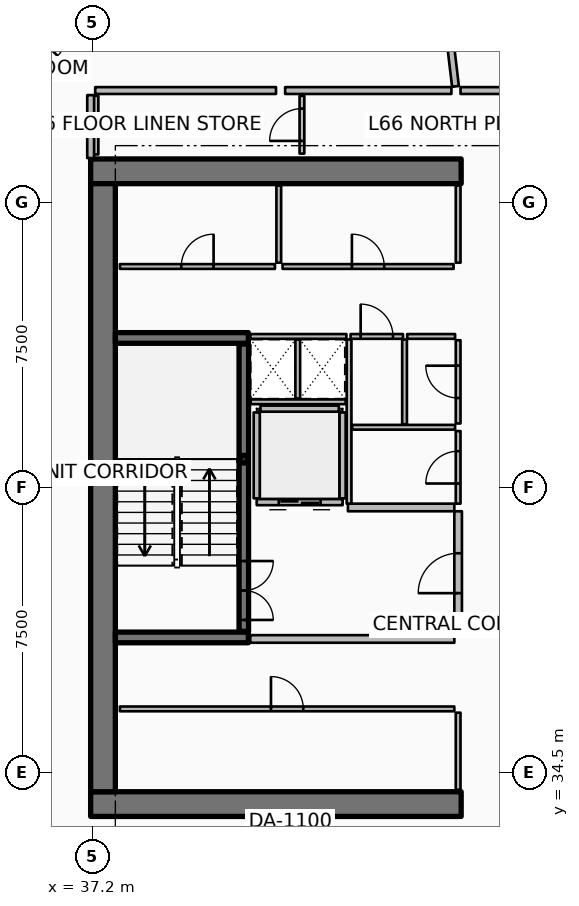
"""IFC4 building model, lengths in metres.
Left out: names, types, materials, properties, quantities, classifications, styles, units other than length and angle.
Written with IfcOpenShell. Run it as: python <this file> out.ifc"""

import sys

from ifc_helpers import new_model, si_unit, direction, frame, frame_2d, origin, origin_2d, place, context, subcontext, project, spatial, rectangle, hollow_rectangle, extrude, element, fill, save


model = new_model("IFC4")
c1 = context("Model", 3, precision=1e-05, world=origin(), true_north=direction((0.0, 1.0)))
c2 = subcontext(c1, "Body", "Model", "MODEL_VIEW")
j1 = project(units=[si_unit("LENGTHUNIT", "METRE"), si_unit("PLANEANGLEUNIT", "RADIAN")], contexts=[c1])
p1 = place(None, origin())
s1 = spatial("IfcSite", under=j1, at=p1, CompositionType="ELEMENT")
p2 = place(p1, origin())
s2 = spatial("IfcBuilding", under=s1, at=p2, CompositionType="ELEMENT")
p3 = place(p2, frame((0.0, 0.0, 263.65)))
s3 = spatial("IfcBuildingStorey", under=s2, at=p3, CompositionType="ELEMENT", Elevation=263.65)
for number, where, z_axis, x_axis in (
    (1, (37.15, 33.675, 0.0), (0.0, 0.0, 1.0), (1.0, 0.0, 0.0)),
    (2, (37.15, 50.325, 0.0), (0.0, 0.0, 1.0), (1.0, 0.0, 0.0)),
):
    element("IfcWall", number, at=place(p3, frame(where, z_axis=z_axis, x_axis=x_axis)), inside=s3, PredefinedType="SHEAR", context=c2, shape_type="SweptSolid", body=[
        extrude(rectangle(XDim=9.75, YDim=0.65, at=frame_2d((4.875, 0.0))), origin(), (0.0, 0.0, 1.0), 3.85),
    ])
p4 = place(p3, frame((37.475, 34.0, 0.0), z_axis=(0.0, 0.0, 1.0), x_axis=(0.0, 1.0, 0.0)))
e3 = element("IfcWall", 3, at=p4, inside=s3, PredefinedType="SHEAR", context=c2, shape_type="SweptSolid", body=[
    extrude(rectangle(XDim=16.0, YDim=0.65, at=frame_2d((8.0, 0.0))), origin(), (0.0, 0.0, 1.0), 3.85),
])
for number, where, z_axis, x_axis in (
    (4, (37.8, 38.06, 0.0), (0.0, 0.0, 1.0), (1.0, 0.0, 0.0)),
    (5, (37.8, 45.94, 0.0), (0.0, 0.0, 1.0), (1.0, 0.0, 0.0)),
):
    element("IfcWall", number, at=place(p3, frame(where, z_axis=z_axis, x_axis=x_axis)), inside=s3, PredefinedType="SHEAR", context=c2, shape_type="SweptSolid", body=[
        extrude(rectangle(XDim=3.5, YDim=0.28, at=frame_2d((1.75, 0.0))), origin(), (0.0, 0.0, 1.0), 3.85),
    ])
p5 = place(p3, frame((41.18, 42.75, 0.0), z_axis=(0.0, 0.0, 1.0), x_axis=(1.0, 0.0, 0.0)))
e6 = element("IfcColumn", 6, at=p5, inside=s3, PredefinedType="COLUMN", context=c2, shape_type="SweptSolid", body=[
    extrude(hollow_rectangle(XDim=0.2, YDim=0.2, WallThickness=0.01, InnerFilletRadius=0.01, OuterFilletRadius=0.02, at=origin_2d()), origin(), (0.0, 0.0, 1.0), 1.72),
])
p6 = place(p3, frame((41.18, 38.22, 0.0), z_axis=(0.0, 0.0, 1.0), x_axis=(0.0, 1.0, 0.0)))
e7 = element("IfcWall", 7, at=p6, inside=s3, PredefinedType="SOLIDWALL", context=c2, shape_type="SweptSolid", body=[
    extrude(rectangle(XDim=7.56, YDim=0.25, at=frame_2d((3.78, 0.0))), origin(), (0.0, 0.0, 1.0), 3.59),
])
p7 = place(p6, frame((0.3, 0.0, 0.0)))
e8 = element("IfcOpeningElement", 8, at=p7, cuts=e7, PredefinedType="OPENING", context=c2, shape_type="SweptSolid", body=[
    extrude(rectangle(XDim=1.55, YDim=2.15, at=frame_2d((0.775, 1.075))), frame((0.0, 0.135, 0.0), z_axis=(0.0, -1.0, 0.0), x_axis=(1.0, 0.0, 0.0)), (0.0, 0.0, 1.0), 0.27),
])
p8 = place(p3, frame((43.78, 41.62, 0.0), z_axis=(0.0, 0.0, 1.0), x_axis=(-1.0, 0.0, 0.0)))
e9 = element("IfcWall", 9, at=p8, inside=s3, PredefinedType="PARTITIONING", context=c2, shape_type="SweptSolid", body=[
    extrude(rectangle(XDim=2.26, YDim=0.16, at=frame_2d((1.13, 0.0))), origin(), (0.0, 0.0, 1.0), 3.59),
])
p9 = place(p8, frame((0.58, 0.0, 0.0)))
e10 = element("IfcOpeningElement", 10, at=p9, cuts=e9, PredefinedType="OPENING", context=c2, shape_type="SweptSolid", body=[
    extrude(rectangle(XDim=1.1, YDim=2.1, at=frame_2d((0.55, 1.05))), frame((0.0, 0.09, 0.0), z_axis=(0.0, -1.0, 0.0), x_axis=(1.0, 0.0, 0.0)), (0.0, 0.0, 1.0), 0.18),
])
for number, where, z_axis, x_axis in (
    (11, (43.78, 41.72, 0.0), (0.0, 0.0, 1.0), (0.0, 1.0, 0.0)),
    (12, (41.52, 41.72, 0.0), (0.0, 0.0, 1.0), (0.0, 1.0, 0.0)),
):
    element("IfcWall", number, at=place(p3, frame(where, z_axis=z_axis, x_axis=x_axis)), inside=s3, PredefinedType="PARTITIONING", context=c2, shape_type="SweptSolid", body=[
        extrude(rectangle(XDim=2.26, YDim=0.16, at=frame_2d((1.13, 0.0))), origin(), (0.0, 0.0, 1.0), 3.59),
    ])
p10 = place(p3, frame((41.62, 44.08, 0.0), z_axis=(0.0, 0.0, 1.0), x_axis=(1.0, 0.0, 0.0)))
e13 = element("IfcWall", 13, at=p10, inside=s3, PredefinedType="PARTITIONING", context=c2, shape_type="SweptSolid", body=[
    extrude(rectangle(XDim=2.06, YDim=0.16, at=frame_2d((1.03, 0.0))), origin(), (0.0, 0.0, 1.0), 3.59),
])
p11 = place(p3, frame((46.82, 34.05, 0.0), z_axis=(0.0, 0.0, 1.0), x_axis=(0.0, 1.0, 0.0)))
e14 = element("IfcWall", 14, at=p11, inside=s3, PredefinedType="PARTITIONING", context=c2, shape_type="SweptSolid", body=[
    extrude(rectangle(XDim=2.03, YDim=0.125, at=frame_2d((1.015, 0.0))), origin(), (0.0, 0.0, 1.0), 3.03),
])
p12 = place(p3, frame((37.92, 36.18, 0.0), z_axis=(0.0, 0.0, 1.0), x_axis=(1.0, 0.0, 0.0)))
e15 = element("IfcWall", 15, at=p12, inside=s3, PredefinedType="PARTITIONING", context=c2, shape_type="SweptSolid", body=[
    extrude(rectangle(XDim=8.8, YDim=0.125, at=frame_2d((4.4, 0.0))), origin(), (0.0, 0.0, 1.0), 3.03),
])
p13 = place(p12, frame((3.975, 0.0, 0.0)))
e16 = element("IfcOpeningElement", 16, at=p13, cuts=e15, PredefinedType="OPENING", context=c2, shape_type="SweptSolid", body=[
    extrude(rectangle(XDim=0.85, YDim=2.06, at=frame_2d((0.425, 1.03))), frame((0.0, 0.073, 0.0), z_axis=(0.0, -1.0, 0.0), x_axis=(1.0, 0.0, 0.0)), (0.0, 0.0, 1.0), 0.145),
])
for number, where, z_axis, x_axis in (
    (17, (46.82, 47.92, 0.0), (0.0, 0.0, 1.0), (0.0, 1.0, 0.0)),
    (18, (42.1, 47.92, 0.0), (0.0, 0.0, 1.0), (0.0, 1.0, 0.0)),
):
    element("IfcWall", number, at=place(p3, frame(where, z_axis=z_axis, x_axis=x_axis)), inside=s3, PredefinedType="PARTITIONING", context=c2, shape_type="SweptSolid", body=[
        extrude(rectangle(XDim=2.03, YDim=0.125, at=frame_2d((1.015, 0.0))), origin(), (0.0, 0.0, 1.0), 3.03),
    ])
p14 = place(p3, frame((37.92, 47.82, 0.0), z_axis=(0.0, 0.0, 1.0), x_axis=(1.0, 0.0, 0.0)))
e19 = element("IfcWall", 19, at=p14, inside=s3, PredefinedType="PARTITIONING", context=c2, shape_type="SweptSolid", body=[
    extrude(rectangle(XDim=4.08, YDim=0.125, at=frame_2d((2.04, 0.0))), origin(), (0.0, 0.0, 1.0), 3.03),
])
p15 = place(p14, frame((1.615, 0.0, 0.0)))
e20 = element("IfcOpeningElement", 20, at=p15, cuts=e19, PredefinedType="OPENING", context=c2, shape_type="SweptSolid", body=[
    extrude(rectangle(XDim=0.85, YDim=2.06, at=frame_2d((0.425, 1.03))), frame((0.0, 0.073, 0.0), z_axis=(0.0, -1.0, 0.0), x_axis=(1.0, 0.0, 0.0)), (0.0, 0.0, 1.0), 0.145),
])
p16 = place(p3, frame((42.2, 47.82, 0.0), z_axis=(0.0, 0.0, 1.0), x_axis=(1.0, 0.0, 0.0)))
e21 = element("IfcWall", 21, at=p16, inside=s3, PredefinedType="PARTITIONING", context=c2, shape_type="SweptSolid", body=[
    extrude(rectangle(XDim=4.5, YDim=0.125, at=frame_2d((2.25, 0.0))), origin(), (0.0, 0.0, 1.0), 3.03),
])
p17 = place(p16, frame((1.825, 0.0, 0.0)))
e22 = element("IfcOpeningElement", 22, at=p17, cuts=e21, PredefinedType="OPENING", context=c2, shape_type="SweptSolid", body=[
    extrude(rectangle(XDim=0.85, YDim=2.06, at=frame_2d((0.425, 1.03))), frame((0.0, 0.073, 0.0), z_axis=(0.0, -1.0, 0.0), x_axis=(1.0, 0.0, 0.0)), (0.0, 0.0, 1.0), 0.145),
])
p18 = place(p3, frame((41.35, 38.02, 0.0), z_axis=(0.0, 0.0, 1.0), x_axis=(1.0, 0.0, 0.0)))
e23 = element("IfcWall", 23, at=p18, inside=s3, PredefinedType="PARTITIONING", context=c2, shape_type="SweptSolid", body=[
    extrude(rectangle(XDim=5.37, YDim=0.2, at=frame_2d((2.685, 0.0))), origin(), (0.0, 0.0, 1.0), 3.59),
])
p19 = place(p3, frame((43.92, 41.48, 0.0), z_axis=(0.0, 0.0, 1.0), x_axis=(1.0, 0.0, 0.0)))
e24 = element("IfcWall", 24, at=p19, inside=s3, PredefinedType="PARTITIONING", context=c2, shape_type="SweptSolid", body=[
    extrude(rectangle(XDim=2.8, YDim=0.2, at=frame_2d((1.4, 0.0))), origin(), (0.0, 0.0, 1.0), 3.59),
])
p20 = place(p3, frame((46.82, 38.12, 0.0), z_axis=(0.0, 0.0, 1.0), x_axis=(0.0, 1.0, 0.0)))
e25 = element("IfcWall", 25, at=p20, inside=s3, PredefinedType="PARTITIONING", context=c2, shape_type="SweptSolid", body=[
    extrude(rectangle(XDim=3.26, YDim=0.2, at=frame_2d((1.63, 0.0))), origin(), (0.0, 0.0, 1.0), 3.59),
])
p21 = place(p20, frame((1.105, 0.0, 0.0)))
e26 = element("IfcOpeningElement", 26, at=p21, cuts=e25, PredefinedType="OPENING", context=c2, shape_type="SweptSolid", body=[
    extrude(rectangle(XDim=1.05, YDim=2.1, at=frame_2d((0.525, 1.05))), frame((0.0, 0.11, 0.0), z_axis=(0.0, -1.0, 0.0), x_axis=(1.0, 0.0, 0.0)), (0.0, 0.0, 1.0), 0.22),
])
p22 = place(p3, frame((41.36, 44.26, 0.0), z_axis=(0.0, 0.0, 1.0), x_axis=(1.0, 0.0, 0.0)))
e27 = element("IfcWall", 27, at=p22, inside=s3, PredefinedType="PARTITIONING", context=c2, shape_type="SweptSolid", body=[
    extrude(rectangle(XDim=2.5, YDim=0.125, at=frame_2d((1.25, 0.0))), origin(), (0.0, 0.0, 1.0), 3.03),
])
p23 = place(p3, frame((42.6, 44.35, 0.0), z_axis=(0.0, 0.0, 1.0), x_axis=(0.0, 1.0, 0.0)))
e28 = element("IfcWall", 28, at=p23, inside=s3, PredefinedType="PARTITIONING", context=c2, shape_type="SweptSolid", body=[
    extrude(rectangle(XDim=1.55, YDim=0.125, at=frame_2d((0.775, 0.0))), origin(), (0.0, 0.0, 1.0), 3.03),
])
p24 = place(p3, frame((43.95, 41.58, 0.0), z_axis=(0.0, 0.0, 1.0), x_axis=(0.0, 1.0, 0.0)))
e29 = element("IfcWall", 29, at=p24, inside=s3, PredefinedType="PARTITIONING", context=c2, shape_type="SweptSolid", body=[
    extrude(rectangle(XDim=4.32, YDim=0.125, at=frame_2d((2.16, 0.0))), origin(), (0.0, 0.0, 1.0), 3.03),
])
p25 = place(p3, frame((44.03, 43.59, 0.0), z_axis=(0.0, 0.0, 1.0), x_axis=(1.0, 0.0, 0.0)))
e30 = element("IfcWall", 30, at=p25, inside=s3, PredefinedType="PARTITIONING", context=c2, shape_type="SweptSolid", body=[
    extrude(rectangle(XDim=2.71, YDim=0.125, at=frame_2d((1.355, 0.0))), origin(), (0.0, 0.0, 1.0), 3.03),
])
p26 = place(p3, frame((45.41, 43.67, 0.0), z_axis=(0.0, 0.0, 1.0), x_axis=(0.0, 1.0, 0.0)))
e31 = element("IfcWall", 31, at=p26, inside=s3, PredefinedType="PARTITIONING", context=c2, shape_type="SweptSolid", body=[
    extrude(rectangle(XDim=2.23, YDim=0.125, at=frame_2d((1.115, 0.0))), origin(), (0.0, 0.0, 1.0), 3.03),
])
p27 = place(p3, frame((46.82, 41.58, 0.0), z_axis=(0.0, 0.0, 1.0), x_axis=(0.0, 1.0, 0.0)))
e32 = element("IfcWall", 32, at=p27, inside=s3, PredefinedType="PARTITIONING", context=c2, shape_type="SweptSolid", body=[
    extrude(rectangle(XDim=1.91, YDim=0.125, at=frame_2d((0.955, 0.0))), origin(), (0.0, 0.0, 1.0), 3.03),
])
p28 = place(p27, frame((0.53, 0.0, 0.0)))
e33 = element("IfcOpeningElement", 33, at=p28, cuts=e32, PredefinedType="OPENING", context=c2, shape_type="SweptSolid", body=[
    extrude(rectangle(XDim=0.85, YDim=2.06, at=frame_2d((0.425, 1.03))), frame((0.0, 0.073, 0.0), z_axis=(0.0, -1.0, 0.0), x_axis=(1.0, 0.0, 0.0)), (0.0, 0.0, 1.0), 0.145),
])
p29 = place(p3, frame((46.82, 43.69, 0.0), z_axis=(0.0, 0.0, 1.0), x_axis=(0.0, 1.0, 0.0)))
e34 = element("IfcWall", 34, at=p29, inside=s3, PredefinedType="PARTITIONING", context=c2, shape_type="SweptSolid", body=[
    extrude(rectangle(XDim=2.19, YDim=0.125, at=frame_2d((1.095, 0.0))), origin(), (0.0, 0.0, 1.0), 3.03),
])
p30 = place(p29, frame((0.67, 0.0, 0.0)))
e35 = element("IfcOpeningElement", 35, at=p30, cuts=e34, PredefinedType="OPENING", context=c2, shape_type="SweptSolid", body=[
    extrude(rectangle(XDim=0.85, YDim=2.06, at=frame_2d((0.425, 1.03))), frame((0.0, 0.073, 0.0), z_axis=(0.0, -1.0, 0.0), x_axis=(1.0, 0.0, 0.0)), (0.0, 0.0, 1.0), 0.145),
])
p31 = place(p3, frame((41.35, 45.98, 0.0), z_axis=(0.0, 0.0, 1.0), x_axis=(1.0, 0.0, 0.0)))
e36 = element("IfcWall", 36, at=p31, inside=s3, PredefinedType="PARTITIONING", context=c2, shape_type="SweptSolid", body=[
    extrude(rectangle(XDim=2.53, YDim=0.125, at=frame_2d((1.265, 0.0))), origin(), (0.0, 0.0, 1.0), 3.03),
])
p32 = place(p3, frame((43.99, 45.98, 0.0), z_axis=(0.0, 0.0, 1.0), x_axis=(1.0, 0.0, 0.0)))
e37 = element("IfcWall", 37, at=p32, inside=s3, PredefinedType="PARTITIONING", context=c2, shape_type="SweptSolid", body=[
    extrude(rectangle(XDim=1.38, YDim=0.125, at=frame_2d((0.69, 0.0))), origin(), (0.0, 0.0, 1.0), 3.03),
])
p33 = place(p32, frame((0.265, 0.0, 0.0)))
e38 = element("IfcOpeningElement", 38, at=p33, cuts=e37, PredefinedType="OPENING", context=c2, shape_type="SweptSolid", body=[
    extrude(rectangle(XDim=0.85, YDim=2.06, at=frame_2d((0.425, 1.03))), frame((0.0, 0.073, 0.0), z_axis=(0.0, -1.0, 0.0), x_axis=(1.0, 0.0, 0.0)), (0.0, 0.0, 1.0), 0.145),
])
p34 = place(p3, frame((45.48, 45.98, 0.0), z_axis=(0.0, 0.0, 1.0), x_axis=(1.0, 0.0, 0.0)))
e39 = element("IfcWall", 39, at=p34, inside=s3, PredefinedType="PARTITIONING", context=c2, shape_type="SweptSolid", body=[
    extrude(rectangle(XDim=1.26, YDim=0.125, at=frame_2d((0.63, 0.0))), origin(), (0.0, 0.0, 1.0), 3.03),
])
p35 = place(p3, frame((37.29, 50.77, 0.0), z_axis=(0.0, 0.0, 1.0), x_axis=(0.0, 1.0, 0.0)))
e40 = element("IfcWall", 40, at=p35, inside=s3, PredefinedType="PARTITIONING", context=c2, shape_type="SweptSolid", body=[
    extrude(rectangle(XDim=1.54, YDim=0.125, at=frame_2d((0.77, 0.0))), origin(), (0.0, 0.0, 1.0), 3.03),
])
p36 = place(p3, frame((42.71, 50.79, 0.0), z_axis=(0.0, 0.0, 1.0), x_axis=(0.0, 1.0, 0.0)))
e41 = element("IfcWall", 41, at=p36, inside=s3, PredefinedType="PARTITIONING", context=c2, shape_type="SweptSolid", body=[
    extrude(rectangle(XDim=1.52, YDim=0.125, at=frame_2d((0.76, 0.0))), origin(), (0.0, 0.0, 1.0), 2.957),
])
p37 = place(p36, frame((0.335, 0.0, 0.0)))
e42 = element("IfcOpeningElement", 42, at=p37, cuts=e41, PredefinedType="OPENING", context=c2, shape_type="SweptSolid", body=[
    extrude(rectangle(XDim=0.85, YDim=2.06, at=frame_2d((0.425, 1.03))), frame((0.0, 0.073, 0.0), z_axis=(0.0, -1.0, 0.0), x_axis=(1.0, 0.0, 0.0)), (0.0, 0.0, 1.0), 0.145),
])
p38 = place(p3, frame((46.75, 52.559, 0.0), z_axis=(0.0, 0.0, 1.0), x_axis=(-0.117540318076, 0.993068111273, 0.0)))
e43 = element("IfcWall", 43, at=p38, inside=s3, PredefinedType="PARTITIONING", context=c2, shape_type="SweptSolid", body=[
    extrude(rectangle(XDim=14.062, YDim=0.18, at=frame_2d((7.031, 0.0))), origin(), (0.0, 0.0, 1.0), 2.957),
])
p39 = place(p3, frame((46.643, 52.45, 0.0), z_axis=(0.0, 0.0, 1.0), x_axis=(-1.0, 0.0, 0.0)))
e44 = element("IfcWall", 44, at=p39, inside=s3, PredefinedType="PARTITIONING", context=c2, shape_type="SweptSolid", body=[
    extrude(rectangle(XDim=4.376, YDim=0.18, at=frame_2d((2.188, 0.0))), origin(), (0.0, 0.0, 1.0), 2.957),
])
p40 = place(p3, frame((42.028, 52.45, 0.0), z_axis=(0.0, 0.0, 1.0), x_axis=(-1.0, 0.0, 0.0)))
e45 = element("IfcWall", 45, at=p40, inside=s3, PredefinedType="PARTITIONING", context=c2, shape_type="SweptSolid", body=[
    extrude(rectangle(XDim=4.758, YDim=0.18, at=frame_2d((2.379, 0.0))), origin(), (0.0, 0.0, 1.0), 2.957),
])
p41 = place(p3, frame((37.15, 52.33, 0.0), z_axis=(0.0, 0.0, 1.0), x_axis=(0.0, -1.0, 0.0)))
e46 = element("IfcWall", 46, at=p41, inside=s3, PredefinedType="PARTITIONING", context=c2, shape_type="SweptSolid", body=[
    extrude(rectangle(XDim=1.656, YDim=0.18, at=frame_2d((0.828, 0.0))), origin(), (0.0, 0.0, 1.0), 2.957),
])
p42 = place(p3, frame((37.506, 55.822, 0.0), z_axis=(0.0, 0.0, 1.0), x_axis=(-0.715105814901, -0.699016218334, 0.0)))
e47 = element("IfcWall", 47, at=p42, inside=s3, PredefinedType="PARTITIONING", context=c2, shape_type="SweptSolid", body=[
    extrude(rectangle(XDim=4.294, YDim=0.125, at=frame_2d((2.147, 0.0))), origin(), (0.0, 0.0, 1.0), 2.957),
])
p43 = place(p42, frame((1.697, 0.0, 0.0)))
e48 = element("IfcOpeningElement", 48, at=p43, cuts=e47, PredefinedType="OPENING", context=c2, shape_type="SweptSolid", body=[
    extrude(rectangle(XDim=0.9, YDim=2.08, at=frame_2d((0.45, 1.04))), frame((0.0, 0.073, 0.0), z_axis=(0.0, -1.0, 0.0), x_axis=(1.0, 0.0, 0.0)), (0.0, 0.0, 1.0), 0.145),
])
p44 = place(p3, frame((50.827, 52.45, 0.0), z_axis=(0.0, 0.0, 1.0), x_axis=(-1.0, 0.0, 0.0)))
e49 = element("IfcWall", 49, at=p44, inside=s3, PredefinedType="PARTITIONING", context=c2, shape_type="SweptSolid", body=[
    extrude(rectangle(XDim=3.944, YDim=0.18, at=frame_2d((1.972, 0.0))), origin(), (0.0, 0.0, 1.0), 2.957),
])
p45 = place(p7, origin())
e50 = element("IfcDoor", 50, at=p45, inside=s3, OperationType="DOUBLE_DOOR_SINGLE_SWING", PredefinedType="DOOR", context=c2, shape_type="SweptSolid", body=[
    extrude(rectangle(XDim=1.55, YDim=2.15, at=frame_2d((0.775, 1.075))), frame((0.0, 0.025, 0.0), z_axis=(0.0, -1.0, 0.0), x_axis=(1.0, 0.0, 0.0)), (0.0, 0.0, 1.0), 0.05),
])
fill(e8, e50)
p46 = place(p9, origin())
e51 = element("IfcDoor", 51, at=p46, inside=s3, OperationType="DOUBLE_DOOR_SLIDING", PredefinedType="DOOR", context=c2, shape_type="SweptSolid", body=[
    extrude(rectangle(XDim=1.1, YDim=2.1, at=frame_2d((0.55, 1.05))), frame((0.0, 0.025, 0.0), z_axis=(0.0, -1.0, 0.0), x_axis=(1.0, 0.0, 0.0)), (0.0, 0.0, 1.0), 0.05),
])
fill(e10, e51)
p47 = place(p13, origin())
e52 = element("IfcDoor", 52, at=p47, inside=s3, OperationType="SINGLE_SWING_LEFT", PredefinedType="DOOR", context=c2, shape_type="SweptSolid", body=[
    extrude(rectangle(XDim=0.85, YDim=2.06, at=frame_2d((0.425, 1.03))), frame((0.0, 0.025, 0.0), z_axis=(0.0, -1.0, 0.0), x_axis=(1.0, 0.0, 0.0)), (0.0, 0.0, 1.0), 0.05),
])
fill(e16, e52)
p48 = place(p15, origin())
e53 = element("IfcDoor", 53, at=p48, inside=s3, OperationType="SINGLE_SWING_RIGHT", PredefinedType="DOOR", context=c2, shape_type="SweptSolid", body=[
    extrude(rectangle(XDim=0.85, YDim=2.06, at=frame_2d((0.425, 1.03))), frame((0.0, 0.025, 0.0), z_axis=(0.0, -1.0, 0.0), x_axis=(1.0, 0.0, 0.0)), (0.0, 0.0, 1.0), 0.05),
])
fill(e20, e53)
p49 = place(p17, origin())
e54 = element("IfcDoor", 54, at=p49, inside=s3, OperationType="SINGLE_SWING_LEFT", PredefinedType="DOOR", context=c2, shape_type="SweptSolid", body=[
    extrude(rectangle(XDim=0.85, YDim=2.06, at=frame_2d((0.425, 1.03))), frame((0.0, 0.025, 0.0), z_axis=(0.0, -1.0, 0.0), x_axis=(1.0, 0.0, 0.0)), (0.0, 0.0, 1.0), 0.05),
])
fill(e22, e54)
p50 = place(p21, origin())
e55 = element("IfcDoor", 55, at=p50, inside=s3, OperationType="SINGLE_SWING_LEFT", PredefinedType="DOOR", context=c2, shape_type="SweptSolid", body=[
    extrude(rectangle(XDim=1.05, YDim=2.1, at=frame_2d((0.525, 1.05))), frame((0.0, 0.025, 0.0), z_axis=(0.0, -1.0, 0.0), x_axis=(1.0, 0.0, 0.0)), (0.0, 0.0, 1.0), 0.05),
])
fill(e26, e55)
p51 = place(p28, origin())
e56 = element("IfcDoor", 56, at=p51, inside=s3, OperationType="SINGLE_SWING_LEFT", PredefinedType="DOOR", context=c2, shape_type="SweptSolid", body=[
    extrude(rectangle(XDim=0.85, YDim=2.06, at=frame_2d((0.425, 1.03))), frame((0.0, 0.025, 0.0), z_axis=(0.0, -1.0, 0.0), x_axis=(1.0, 0.0, 0.0)), (0.0, 0.0, 1.0), 0.05),
])
fill(e33, e56)
p52 = place(p30, origin())
e57 = element("IfcDoor", 57, at=p52, inside=s3, OperationType="SINGLE_SWING_RIGHT", PredefinedType="DOOR", context=c2, shape_type="SweptSolid", body=[
    extrude(rectangle(XDim=0.85, YDim=2.06, at=frame_2d((0.425, 1.03))), frame((0.0, 0.025, 0.0), z_axis=(0.0, -1.0, 0.0), x_axis=(1.0, 0.0, 0.0)), (0.0, 0.0, 1.0), 0.05),
])
fill(e35, e57)
p53 = place(p33, origin())
e58 = element("IfcDoor", 58, at=p53, inside=s3, OperationType="SINGLE_SWING_LEFT", PredefinedType="DOOR", context=c2, shape_type="SweptSolid", body=[
    extrude(rectangle(XDim=0.85, YDim=2.06, at=frame_2d((0.425, 1.03))), frame((0.0, 0.025, 0.0), z_axis=(0.0, -1.0, 0.0), x_axis=(1.0, 0.0, 0.0)), (0.0, 0.0, 1.0), 0.05),
])
fill(e38, e58)
p54 = place(p37, origin())
e59 = element("IfcDoor", 59, at=p54, inside=s3, OperationType="SINGLE_SWING_LEFT", PredefinedType="DOOR", context=c2, shape_type="SweptSolid", body=[
    extrude(rectangle(XDim=0.85, YDim=2.06, at=frame_2d((0.425, 1.03))), frame((0.0, 0.025, 0.0), z_axis=(0.0, -1.0, 0.0), x_axis=(1.0, 0.0, 0.0)), (0.0, 0.0, 1.0), 0.05),
])
fill(e42, e59)
save(model, sys.argv[1])
